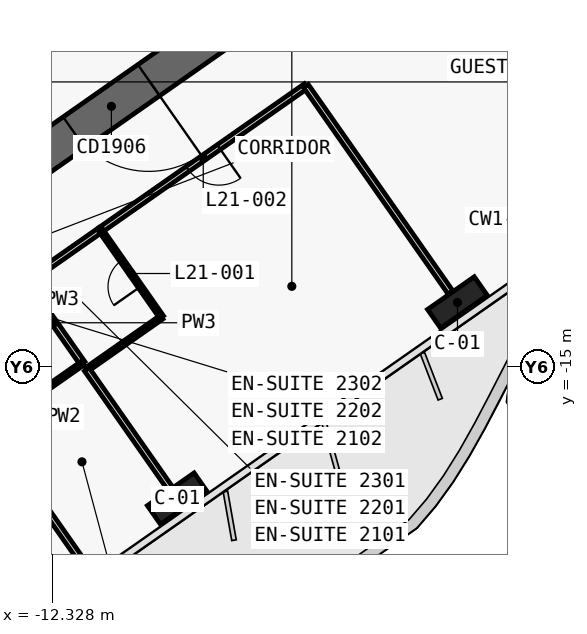
"""IFC4 building model, lengths in metres.
Left out: names, types, materials, properties, quantities, classifications, styles, units other than length and angle.
Written with IfcOpenShell. Run it as: python <this file> out.ifc"""

import sys

from ifc_helpers import new_model, si_unit, direction, frame, frame_2d, origin, origin_2d, place, context, subcontext, project, spatial, polyline, rectangle, outline, extrude, element, fill, save


model = new_model("IFC4")
c1 = context("Model", 3, precision=1e-05, world=origin(), true_north=direction((0.0, 1.0)))
c2 = subcontext(c1, "Body", "Model", "MODEL_VIEW")
j1 = project(units=[si_unit("LENGTHUNIT", "METRE"), si_unit("PLANEANGLEUNIT", "RADIAN")], contexts=[c1])
p1 = place(None, origin())
s1 = spatial("IfcSite", under=j1, at=p1, CompositionType="ELEMENT")
p2 = place(p1, origin())
s2 = spatial("IfcBuilding", under=s1, at=p2, CompositionType="ELEMENT")
p3 = place(p2, frame((0.0, 0.0, 101.3)))
s3 = spatial("IfcBuildingStorey", under=s2, at=p3, CompositionType="ELEMENT", Elevation=101.3)
p4 = place(p3, frame((0.037, 11.867, 0.0), z_axis=(0.0, 0.0, 1.0), x_axis=(-0.819155306259, -0.573571777746, 0.0)))
e1 = element("IfcWall", 1, at=p4, inside=s3, PredefinedType="SHEAR", context=c2, shape_type="SweptSolid", body=[
    extrude(outline(polyline([(33.837, 0.5), (0.7, 0.5), (0.0, -0.5), (33.837, -0.5), (33.837, 0.5)])), origin(), (0.0, 0.0, 1.0), 3.6),
])
p5 = place(p3, frame((0.037, -0.585, 0.0), z_axis=(0.0, 0.0, 1.0), x_axis=(-0.819157152511, -0.573569140985, 0.0)))
e2 = element("IfcWall", 2, at=p5, inside=s3, PredefinedType="SHEAR", context=c2, shape_type="SweptSolid", body=[
    extrude(outline(polyline([(26.695, 0.5), (0.7, 0.5), (0.0, -0.5), (26.695, -0.5), (26.695, 0.5)])), origin(), (0.0, 0.0, 1.0), 3.6),
])
p6 = place(p5, frame((2.995, 0.0, 0.0)))
e3 = element("IfcOpeningElement", 3, at=p6, cuts=e2, PredefinedType="OPENING", context=c2, shape_type="SweptSolid", body=[
    extrude(rectangle(XDim=2.4, YDim=2.1, at=frame_2d((1.2, 1.05))), frame((0.0, 0.51, 0.0), z_axis=(0.0, -1.0, 0.0), x_axis=(1.0, 0.0, 0.0)), (0.0, 0.0, 1.0), 1.02),
])
p7 = place(p5, frame((11.995, 0.0, 0.0)))
e4 = element("IfcOpeningElement", 4, at=p7, cuts=e2, PredefinedType="OPENING", context=c2, shape_type="SweptSolid", body=[
    extrude(rectangle(XDim=2.4, YDim=2.1, at=frame_2d((1.2, 1.05))), frame((0.0, 0.51, 0.0), z_axis=(0.0, -1.0, 0.0), x_axis=(1.0, 0.0, 0.0)), (0.0, 0.0, 1.0), 1.02),
])
p8 = place(p3, frame((-2.638, 3.768, 0.0), z_axis=(0.0, 0.0, 1.0), x_axis=(-0.819148977158, -0.573580816643, 0.0)))
e5 = element("IfcWall", 5, at=p8, inside=s3, PredefinedType="SHEAR", context=c2, shape_type="SweptSolid", body=[
    extrude(outline(polyline([(26.0, 0.25), (0.0, 0.25), (0.0, -0.25), (26.0, -0.25), (26.0, 0.25)])), origin(), (0.0, 0.0, 1.0), 3.6),
])
p9 = place(p8, frame((1.169, 0.0, 0.0)))
e6 = element("IfcOpeningElement", 6, at=p9, cuts=e5, PredefinedType="OPENING", context=c2, shape_type="SweptSolid", body=[
    extrude(rectangle(XDim=1.1, YDim=2.1, at=frame_2d((0.55, 1.05))), frame((0.0, 0.26, 0.0), z_axis=(0.0, -1.0, 0.0), x_axis=(1.0, 0.0, 0.0)), (0.0, 0.0, 1.0), 0.52),
])
p10 = place(p8, frame((3.206, 0.0, 0.0)))
e7 = element("IfcOpeningElement", 7, at=p10, cuts=e5, PredefinedType="OPENING", context=c2, shape_type="SweptSolid", body=[
    extrude(rectangle(XDim=1.1, YDim=2.1, at=frame_2d((0.55, 1.05))), frame((0.0, 0.26, 0.0), z_axis=(0.0, -1.0, 0.0), x_axis=(1.0, 0.0, 0.0)), (0.0, 0.0, 1.0), 0.52),
])
p11 = place(p8, frame((5.244, 0.0, 0.0)))
e8 = element("IfcOpeningElement", 8, at=p11, cuts=e5, PredefinedType="OPENING", context=c2, shape_type="SweptSolid", body=[
    extrude(rectangle(XDim=1.1, YDim=2.1, at=frame_2d((0.55, 1.05))), frame((0.0, 0.26, 0.0), z_axis=(0.0, -1.0, 0.0), x_axis=(1.0, 0.0, 0.0)), (0.0, 0.0, 1.0), 0.52),
])
p12 = place(p8, frame((7.281, 0.0, 0.0)))
e9 = element("IfcOpeningElement", 9, at=p12, cuts=e5, PredefinedType="OPENING", context=c2, shape_type="SweptSolid", body=[
    extrude(rectangle(XDim=1.1, YDim=2.1, at=frame_2d((0.55, 1.05))), frame((0.0, 0.26, 0.0), z_axis=(0.0, -1.0, 0.0), x_axis=(1.0, 0.0, 0.0)), (0.0, 0.0, 1.0), 0.52),
])
p13 = place(p8, frame((9.688, 0.0, 0.0)))
e10 = element("IfcOpeningElement", 10, at=p13, cuts=e5, PredefinedType="OPENING", context=c2, shape_type="SweptSolid", body=[
    extrude(rectangle(XDim=1.1, YDim=2.1, at=frame_2d((0.55, 1.05))), frame((0.0, 0.26, 0.0), z_axis=(0.0, -1.0, 0.0), x_axis=(1.0, 0.0, 0.0)), (0.0, 0.0, 1.0), 0.52),
])
p14 = place(p8, frame((11.863, 0.0, 0.0)))
e11 = element("IfcOpeningElement", 11, at=p14, cuts=e5, PredefinedType="OPENING", context=c2, shape_type="SweptSolid", body=[
    extrude(rectangle(XDim=1.1, YDim=2.1, at=frame_2d((0.55, 1.05))), frame((0.0, 0.26, 0.0), z_axis=(0.0, -1.0, 0.0), x_axis=(1.0, 0.0, 0.0)), (0.0, 0.0, 1.0), 0.52),
])
p15 = place(p8, frame((14.038, 0.0, 0.0)))
e12 = element("IfcOpeningElement", 12, at=p15, cuts=e5, PredefinedType="OPENING", context=c2, shape_type="SweptSolid", body=[
    extrude(rectangle(XDim=1.1, YDim=2.1, at=frame_2d((0.55, 1.05))), frame((0.0, 0.26, 0.0), z_axis=(0.0, -1.0, 0.0), x_axis=(1.0, 0.0, 0.0)), (0.0, 0.0, 1.0), 0.52),
])
p16 = place(p8, frame((16.212, 0.0, 0.0)))
e13 = element("IfcOpeningElement", 13, at=p16, cuts=e5, PredefinedType="OPENING", context=c2, shape_type="SweptSolid", body=[
    extrude(rectangle(XDim=1.1, YDim=2.1, at=frame_2d((0.55, 1.05))), frame((0.0, 0.26, 0.0), z_axis=(0.0, -1.0, 0.0), x_axis=(1.0, 0.0, 0.0)), (0.0, 0.0, 1.0), 0.52),
])
for number, where, z_axis, x_axis in (
    (14, (-1.665, -13.313, 0.0), (0.0, 0.0, 1.0), (-0.819, -0.574, 0.0)),
    (15, (-9.038, -18.475, 0.0), (0.0, 0.0, 1.0), (-0.819, -0.574, 0.0)),
):
    element("IfcColumn", number, at=place(p3, frame(where, z_axis=z_axis, x_axis=x_axis)), inside=s3, PredefinedType="COLUMN", context=c2, shape_type="SweptSolid", body=[
        extrude(rectangle(XDim=1.5, YDim=0.6, at=origin_2d()), origin(), (0.0, 0.0, 1.0), 3.6),
    ])
p17 = place(p3, frame((-5.652, -7.62, 0.0), z_axis=(0.0, 0.0, 1.0), x_axis=(-0.819155459934, -0.573571558274, 0.0)))
e16 = element("IfcWall", 16, at=p17, inside=s3, PredefinedType="PARTITIONING", context=c2, shape_type="SweptSolid", body=[
    extrude(rectangle(XDim=6.601, YDim=0.15, at=frame_2d((3.301, 0.0))), origin(), (0.0, 0.0, 1.0), 2.6),
])
p18 = place(p17, frame((2.8, 0.0, 0.0)))
e17 = element("IfcOpeningElement", 17, at=p18, cuts=e16, PredefinedType="OPENING", context=c2, shape_type="SweptSolid", body=[
    extrude(rectangle(XDim=1.0, YDim=2.1, at=frame_2d((0.5, 1.05))), frame((0.0, 0.085, 0.0), z_axis=(0.0, -1.0, 0.0), x_axis=(1.0, 0.0, 0.0)), (0.0, 0.0, 1.0), 0.17),
])
p19 = place(p3, frame((-11.056, -11.404, 0.0), z_axis=(0.0, 0.0, 1.0), x_axis=(-0.819146032251, -0.573585022335, 0.0)))
e18 = element("IfcWall", 18, at=p19, inside=s3, PredefinedType="PARTITIONING", context=c2, shape_type="SweptSolid", body=[
    extrude(rectangle(XDim=2.404, YDim=0.15, at=frame_2d((1.202, 0.0))), origin(), (0.0, 0.0, 1.0), 2.6),
])
p20 = place(p3, frame((-1.849, -13.051, 0.0), z_axis=(0.0, 0.0, 1.0), x_axis=(-0.573575988258, 0.819152358047, 0.0)))
e19 = element("IfcWall", 19, at=p20, inside=s3, PredefinedType="PARTITIONING", context=c2, shape_type="SweptSolid", body=[
    extrude(rectangle(XDim=6.632, YDim=0.15, at=frame_2d((3.316, 0.0))), origin(), (0.0, 0.0, 1.0), 2.6),
])
p21 = place(p3, frame((-11.417, -15.076, 0.0), z_axis=(0.0, 0.0, 1.0), x_axis=(0.819141114317, 0.573592045652, 0.0)))
e20 = element("IfcWall", 20, at=p21, inside=s3, PredefinedType="PARTITIONING", context=c2, shape_type="SweptSolid", body=[
    extrude(rectangle(XDim=2.4, YDim=0.12, at=frame_2d((1.2, 0.0))), origin(), (0.0, 0.0, 1.0), 2.6),
])
p22 = place(p3, frame((-9.451, -13.698, 0.0), z_axis=(0.0, 0.0, 1.0), x_axis=(-0.573591086599, 0.819141785879, 0.0)))
e21 = element("IfcWall", 21, at=p22, inside=s3, PredefinedType="PARTITIONING", context=c2, shape_type="SweptSolid", body=[
    extrude(rectangle(XDim=2.8, YDim=0.12, at=frame_2d((1.4, 0.0))), origin(), (0.0, 0.0, 1.0), 3.32),
])
p23 = place(p22, frame((0.975, 0.0, 0.0)))
e22 = element("IfcOpeningElement", 22, at=p23, cuts=e21, PredefinedType="OPENING", context=c2, shape_type="SweptSolid", body=[
    extrude(rectangle(XDim=0.85, YDim=2.05, at=frame_2d((0.425, 1.025))), frame((0.0, 0.07, 0.0), z_axis=(0.0, -1.0, 0.0), x_axis=(1.0, 0.0, 0.0)), (0.0, 0.0, 1.0), 0.14),
])
p24 = place(p3, frame((-9.221, -18.213, 0.0), z_axis=(0.0, 0.0, 1.0), x_axis=(-0.573594994199, 0.819139049631, 0.0)))
e23 = element("IfcWall", 23, at=p24, inside=s3, PredefinedType="PARTITIONING", context=c2, shape_type="SweptSolid", body=[
    extrude(rectangle(XDim=3.829, YDim=0.15, at=frame_2d((1.915, 0.0))), origin(), (0.0, 0.0, 1.0), 2.6),
])
p25 = place(p3, frame((-11.531, -14.913, 0.0), z_axis=(0.0, 0.0, 1.0), x_axis=(-0.573544201094, 0.819174614714, 0.0)))
e24 = element("IfcWall", 24, at=p25, inside=s3, PredefinedType="PARTITIONING", context=c2, shape_type="SweptSolid", body=[
    extrude(rectangle(XDim=2.602, YDim=0.15, at=frame_2d((1.301, 0.0))), origin(), (0.0, 0.0, 1.0), 2.6),
])
p26 = place(p3, frame((-12.843, -15.83, 0.0), z_axis=(0.0, 0.0, 1.0), x_axis=(0.81918174131, 0.573534022273, 0.0)))
e25 = element("IfcWall", 25, at=p26, inside=s3, PredefinedType="PARTITIONING", context=c2, shape_type="SweptSolid", body=[
    extrude(rectangle(XDim=1.6, YDim=0.12, at=frame_2d((0.8, 0.0))), origin(), (0.0, 0.0, 1.0), 2.6),
])
p27 = place(p3, frame((-11.294, -20.482, 0.0), z_axis=(0.0, 0.0, 1.0), x_axis=(-0.573572324301, 0.819154923562, 0.0)))
e26 = element("IfcWall", 26, at=p27, inside=s3, PredefinedType="PARTITIONING", context=c2, shape_type="SweptSolid", body=[
    extrude(rectangle(XDim=7.3, YDim=0.15, at=frame_2d((3.65, 0.0))), origin(), (0.0, 0.0, 1.0), 2.5),
])
p28 = place(p7, origin())
e27 = element("IfcDoor", 27, at=p28, inside=s3, OperationType="DOUBLE_DOOR_SINGLE_SWING", PredefinedType="DOOR", context=c2, shape_type="SweptSolid", body=[
    extrude(rectangle(XDim=2.4, YDim=2.1, at=frame_2d((1.2, 1.05))), frame((0.0, 0.025, 0.0), z_axis=(0.0, -1.0, 0.0), x_axis=(1.0, 0.0, 0.0)), (0.0, 0.0, 1.0), 0.05),
])
fill(e4, e27)
p29 = place(p23, origin())
e28 = element("IfcDoor", 28, at=p29, inside=s3, OperationType="SINGLE_SWING_LEFT", PredefinedType="DOOR", context=c2, shape_type="SweptSolid", body=[
    extrude(rectangle(XDim=0.85, YDim=2.05, at=frame_2d((0.425, 1.025))), frame((0.0, 0.025, 0.0), z_axis=(0.0, -1.0, 0.0), x_axis=(1.0, 0.0, 0.0)), (0.0, 0.0, 1.0), 0.05),
])
fill(e22, e28)
p30 = place(p18, origin())
e29 = element("IfcDoor", 29, at=p30, inside=s3, OperationType="SINGLE_SWING_LEFT", PredefinedType="DOOR", context=c2, shape_type="SweptSolid", body=[
    extrude(rectangle(XDim=1.0, YDim=2.1, at=frame_2d((0.5, 1.05))), frame((0.0, 0.025, 0.0), z_axis=(0.0, -1.0, 0.0), x_axis=(1.0, 0.0, 0.0)), (0.0, 0.0, 1.0), 0.05),
])
fill(e17, e29)
save(model, sys.argv[1])
